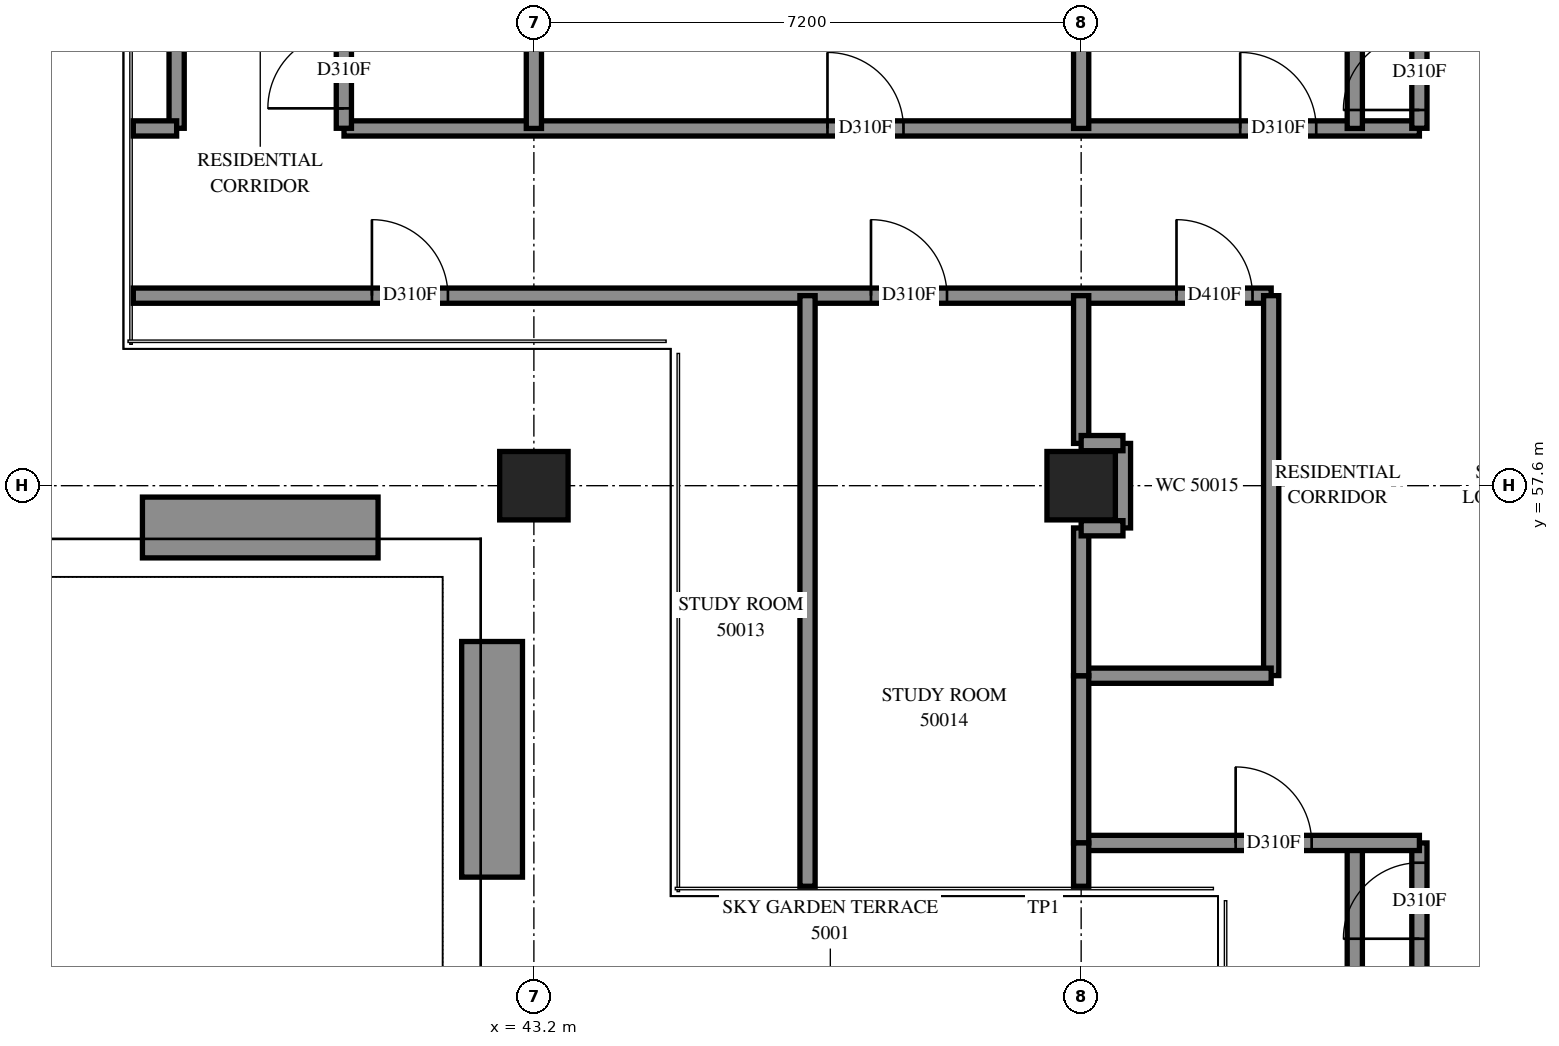
"""IFC4 building model, lengths in metres.
Left out: names, types, materials, properties, quantities, classifications, styles, units other than length and angle.
Written with IfcOpenShell. Run it as: python <this file> out.ifc"""

import sys

from ifc_helpers import new_model, si_unit, direction, frame, frame_2d, origin, origin_2d, place, context, subcontext, project, spatial, rectangle, extrude, element, fill, save


model = new_model("IFC4")
c1 = context("Model", 3, precision=1e-05, world=origin(), true_north=direction((0.0, 1.0)))
c2 = subcontext(c1, "Body", "Model", "MODEL_VIEW")
j1 = project(units=[si_unit("LENGTHUNIT", "METRE"), si_unit("PLANEANGLEUNIT", "RADIAN")], contexts=[c1])
p1 = place(None, origin())
s1 = spatial("IfcSite", under=j1, at=p1, CompositionType="ELEMENT")
p2 = place(p1, origin())
s2 = spatial("IfcBuilding", under=s1, at=p2, CompositionType="ELEMENT")
p3 = place(p2, frame((0.0, 0.0, 185.4)))
s3 = spatial("IfcBuildingStorey", under=s2, at=p3, CompositionType="ELEMENT", Elevation=185.4)
for number, where, z_axis, x_axis in (
    (1, (43.2, 57.6, 0.0), (0.0, 0.0, 1.0), (1.0, 0.0, 0.0)),
    (2, (50.4, 57.6, 0.0), (0.0, 0.0, 1.0), (1.0, 0.0, 0.0)),
):
    element("IfcColumn", number, at=place(p3, frame(where, z_axis=z_axis, x_axis=x_axis)), inside=s3, PredefinedType="COLUMN", context=c2, shape_type="SweptSolid", body=[
        extrude(rectangle(XDim=0.9, YDim=0.9, at=origin_2d()), origin(), (0.0, 0.0, 1.0), 3.9),
    ])
for number, where, z_axis, x_axis in (
    (3, (38.05, 57.05, 0.0), (0.0, 0.0, 1.0), (1.0, 0.0, 0.0)),
    (4, (42.65, 55.55, 0.0), (0.0, 0.0, 1.0), (0.0, -1.0, 0.0)),
):
    element("IfcWall", number, at=place(p3, frame(where, z_axis=z_axis, x_axis=x_axis)), inside=s3, PredefinedType="SOLIDWALL", context=c2, shape_type="SweptSolid", body=[
        extrude(rectangle(XDim=3.1, YDim=0.8, at=frame_2d((1.55, 0.0))), origin(), (0.0, 0.0, 1.0), 0.65),
    ])
p4 = place(p3, frame((37.93, 60.1, 0.0), z_axis=(0.0, 0.0, 1.0), x_axis=(1.0, 0.0, 0.0)))
e5 = element("IfcWall", 5, at=p4, inside=s3, PredefinedType="PARTITIONING", context=c2, shape_type="SweptSolid", body=[
    extrude(rectangle(XDim=14.97, YDim=0.2, at=frame_2d((7.485, 0.0))), origin(), (0.0, 0.0, 1.0), 3.9),
])
p5 = place(p4, frame((3.139, 0.0, 0.0)))
e6 = element("IfcOpeningElement", 6, at=p5, cuts=e5, PredefinedType="OPENING", context=c2, shape_type="SweptSolid", body=[
    extrude(rectangle(XDim=1.0, YDim=2.1, at=frame_2d((0.5, 1.05))), frame((0.0, 0.11, 0.0), z_axis=(0.0, -1.0, 0.0), x_axis=(1.0, 0.0, 0.0)), (0.0, 0.0, 1.0), 0.22),
])
p6 = place(p4, frame((9.705, 0.0, 0.0)))
e7 = element("IfcOpeningElement", 7, at=p6, cuts=e5, PredefinedType="OPENING", context=c2, shape_type="SweptSolid", body=[
    extrude(rectangle(XDim=1.0, YDim=2.1, at=frame_2d((0.5, 1.05))), frame((0.0, 0.11, 0.0), z_axis=(0.0, -1.0, 0.0), x_axis=(1.0, 0.0, 0.0)), (0.0, 0.0, 1.0), 0.22),
])
p7 = place(p4, frame((13.724, 0.0, 0.0)))
e8 = element("IfcOpeningElement", 8, at=p7, cuts=e5, PredefinedType="OPENING", context=c2, shape_type="SweptSolid", body=[
    extrude(rectangle(XDim=1.0, YDim=2.1, at=frame_2d((0.5, 1.05))), frame((0.0, 0.11, 0.0), z_axis=(0.0, -1.0, 0.0), x_axis=(1.0, 0.0, 0.0)), (0.0, 0.0, 1.0), 0.22),
])
p8 = place(p3, frame((40.702, 62.3, 0.0), z_axis=(0.0, 0.0, 1.0), x_axis=(1.0, 0.0, 0.0)))
e9 = element("IfcWall", 9, at=p8, inside=s3, PredefinedType="PARTITIONING", context=c2, shape_type="SweptSolid", body=[
    extrude(rectangle(XDim=14.148, YDim=0.2, at=frame_2d((7.074, 0.0))), origin(), (0.0, 0.0, 1.0), 3.9),
])
p9 = place(p8, frame((6.361, 0.0, 0.0)))
e10 = element("IfcOpeningElement", 10, at=p9, cuts=e9, PredefinedType="OPENING", context=c2, shape_type="SweptSolid", body=[
    extrude(rectangle(XDim=1.0, YDim=2.1, at=frame_2d((0.5, 1.05))), frame((0.0, 0.11, 0.0), z_axis=(0.0, -1.0, 0.0), x_axis=(1.0, 0.0, 0.0)), (0.0, 0.0, 1.0), 0.22),
])
p10 = place(p8, frame((11.79, 0.0, 0.0)))
e11 = element("IfcOpeningElement", 11, at=p10, cuts=e9, PredefinedType="OPENING", context=c2, shape_type="SweptSolid", body=[
    extrude(rectangle(XDim=1.0, YDim=2.1, at=frame_2d((0.5, 1.05))), frame((0.0, 0.11, 0.0), z_axis=(0.0, -1.0, 0.0), x_axis=(1.0, 0.0, 0.0)), (0.0, 0.0, 1.0), 0.22),
])
for number, where, z_axis, x_axis in (
    (12, (46.8, 52.33, 0.0), (0.0, 0.0, 1.0), (0.0, 1.0, 0.0)),
    (13, (54.0, 45.13, 0.0), (0.0, 0.0, 1.0), (0.0, 1.0, 0.0)),
    (14, (54.0, 62.3, 0.0), (0.0, 0.0, 1.0), (0.0, 1.0, 0.0)),
):
    element("IfcWall", number, at=place(p3, frame(where, z_axis=z_axis, x_axis=x_axis)), inside=s3, PredefinedType="PARTITIONING", context=c2, shape_type="SweptSolid", body=[
        extrude(rectangle(XDim=7.77, YDim=0.2, at=frame_2d((3.885, 0.0))), origin(), (0.0, 0.0, 1.0), 3.9),
    ])
p11 = place(p3, frame((54.85, 47.65, 0.0), z_axis=(0.0, 0.0, 1.0), x_axis=(0.0, 1.0, 0.0)))
e15 = element("IfcWall", 15, at=p11, inside=s3, PredefinedType="PARTITIONING", context=c2, shape_type="SweptSolid", body=[
    extrude(rectangle(XDim=5.25, YDim=0.2, at=frame_2d((2.625, 0.0))), origin(), (0.0, 0.0, 1.0), 3.9),
])
p12 = place(p11, frame((3.99, 0.0, 0.0)))
e16 = element("IfcOpeningElement", 16, at=p12, cuts=e15, PredefinedType="OPENING", context=c2, shape_type="SweptSolid", body=[
    extrude(rectangle(XDim=1.0, YDim=2.1, at=frame_2d((0.5, 1.05))), frame((0.0, 0.11, 0.0), z_axis=(0.0, -1.0, 0.0), x_axis=(1.0, 0.0, 0.0)), (0.0, 0.0, 1.0), 0.22),
])
p13 = place(p3, frame((54.85, 62.302, 0.0), z_axis=(0.0, 0.0, 1.0), x_axis=(0.0, 1.0, 0.0)))
e17 = element("IfcWall", 17, at=p13, inside=s3, PredefinedType="PARTITIONING", context=c2, shape_type="SweptSolid", body=[
    extrude(rectangle(XDim=5.248, YDim=0.2, at=frame_2d((2.624, 0.0))), origin(), (0.0, 0.0, 1.0), 3.9),
])
p14 = place(p13, frame((0.241, 0.0, 0.0)))
e18 = element("IfcOpeningElement", 18, at=p14, cuts=e17, PredefinedType="OPENING", context=c2, shape_type="SweptSolid", body=[
    extrude(rectangle(XDim=1.0, YDim=2.1, at=frame_2d((0.5, 1.05))), frame((0.0, 0.11, 0.0), z_axis=(0.0, -1.0, 0.0), x_axis=(1.0, 0.0, 0.0)), (0.0, 0.0, 1.0), 0.22),
])
p15 = place(p3, frame((52.9, 55.102, 0.0), z_axis=(0.0, 0.0, 1.0), x_axis=(0.0, 1.0, 0.0)))
e19 = element("IfcWall", 19, at=p15, inside=s3, PredefinedType="PARTITIONING", context=c2, shape_type="SweptSolid", body=[
    extrude(rectangle(XDim=4.998, YDim=0.2, at=frame_2d((2.499, 0.0))), origin(), (0.0, 0.0, 1.0), 3.9),
])
p16 = place(p3, frame((40.7, 62.302, 0.0), z_axis=(0.0, 0.0, 1.0), x_axis=(0.0, 1.0, 0.0)))
e20 = element("IfcWall", 20, at=p16, inside=s3, PredefinedType="PARTITIONING", context=c2, shape_type="SweptSolid", body=[
    extrude(rectangle(XDim=4.798, YDim=0.2, at=frame_2d((2.399, 0.0))), origin(), (0.0, 0.0, 1.0), 3.9),
])
p17 = place(p16, frame((0.262, 0.0, 0.0)))
e21 = element("IfcOpeningElement", 21, at=p17, cuts=e20, PredefinedType="OPENING", context=c2, shape_type="SweptSolid", body=[
    extrude(rectangle(XDim=1.0, YDim=2.1, at=frame_2d((0.5, 1.05))), frame((0.0, 0.11, 0.0), z_axis=(0.0, -1.0, 0.0), x_axis=(1.0, 0.0, 0.0)), (0.0, 0.0, 1.0), 0.22),
])
p18 = place(p3, frame((50.4, 52.9, 0.0), z_axis=(0.0, 0.0, 1.0), x_axis=(1.0, 0.0, 0.0)))
e22 = element("IfcWall", 22, at=p18, inside=s3, PredefinedType="PARTITIONING", context=c2, shape_type="SweptSolid", body=[
    extrude(rectangle(XDim=4.45, YDim=0.2, at=frame_2d((2.225, 0.0))), origin(), (0.0, 0.0, 1.0), 3.9),
])
p19 = place(p18, frame((2.033, 0.0, 0.0)))
e23 = element("IfcOpeningElement", 23, at=p19, cuts=e22, PredefinedType="OPENING", context=c2, shape_type="SweptSolid", body=[
    extrude(rectangle(XDim=1.0, YDim=2.1, at=frame_2d((0.5, 1.05))), frame((0.0, 0.11, 0.0), z_axis=(0.0, -1.0, 0.0), x_axis=(1.0, 0.0, 0.0)), (0.0, 0.0, 1.0), 0.22),
])
p20 = place(p3, frame((38.5, 62.302, 0.0), z_axis=(0.0, 0.0, 1.0), x_axis=(0.0, 1.0, 0.0)))
e24 = element("IfcWall", 24, at=p20, inside=s3, PredefinedType="PARTITIONING", context=c2, shape_type="SweptSolid", body=[
    extrude(rectangle(XDim=2.598, YDim=0.2, at=frame_2d((1.299, 0.0))), origin(), (0.0, 0.0, 1.0), 3.9),
])
p21 = place(p3, frame((50.4, 55.1, 0.0), z_axis=(0.0, 0.0, 1.0), x_axis=(1.0, 0.0, 0.0)))
e25 = element("IfcWall", 25, at=p21, inside=s3, PredefinedType="PARTITIONING", context=c2, shape_type="SweptSolid", body=[
    extrude(rectangle(XDim=2.5, YDim=0.2, at=frame_2d((1.25, 0.0))), origin(), (0.0, 0.0, 1.0), 3.9),
])
p22 = place(p3, frame((50.4, 52.9, 0.0), z_axis=(0.0, 0.0, 1.0), x_axis=(0.0, 1.0, 0.0)))
e26 = element("IfcWall", 26, at=p22, inside=s3, PredefinedType="PARTITIONING", context=c2, shape_type="SweptSolid", body=[
    extrude(rectangle(XDim=2.2, YDim=0.2, at=frame_2d((1.1, 0.0))), origin(), (0.0, 0.0, 1.0), 3.9),
])
for number, where, z_axis, x_axis in (
    (27, (43.2, 62.3, 0.0), (0.0, 0.0, 1.0), (0.0, 1.0, 0.0)),
    (28, (50.4, 62.3, 0.0), (0.0, 0.0, 1.0), (0.0, 1.0, 0.0)),
):
    element("IfcWall", number, at=place(p3, frame(where, z_axis=z_axis, x_axis=x_axis)), inside=s3, PredefinedType="PARTITIONING", context=c2, shape_type="SweptSolid", body=[
        extrude(rectangle(XDim=2.05, YDim=0.2, at=frame_2d((1.025, 0.0))), origin(), (0.0, 0.0, 1.0), 3.9),
    ])
for number, where, z_axis, x_axis in (
    (29, (50.4, 58.156, 0.0), (0.0, 0.0, 1.0), (0.0, 1.0, 0.0)),
    (30, (50.4, 55.1, 0.0), (0.0, 0.0, 1.0), (0.0, 1.0, 0.0)),
):
    element("IfcWall", number, at=place(p3, frame(where, z_axis=z_axis, x_axis=x_axis)), inside=s3, PredefinedType="PARTITIONING", context=c2, shape_type="SweptSolid", body=[
        extrude(rectangle(XDim=1.944, YDim=0.2, at=frame_2d((0.972, 0.0))), origin(), (0.0, 0.0, 1.0), 3.9),
    ])
p23 = place(p3, frame((50.95, 57.044, 0.0), z_axis=(0.0, 0.0, 1.0), x_axis=(0.0, 1.0, 0.0)))
e31 = element("IfcWall", 31, at=p23, inside=s3, PredefinedType="PARTITIONING", context=c2, shape_type="SweptSolid", body=[
    extrude(rectangle(XDim=1.112, YDim=0.2, at=frame_2d((0.556, 0.0))), origin(), (0.0, 0.0, 1.0), 3.9),
])
for number, where, z_axis, x_axis in (
    (32, (37.93, 62.3, 0.0), (0.0, 0.0, 1.0), (1.0, 0.0, 0.0)),
    (33, (50.4, 52.33, 0.0), (0.0, 0.0, 1.0), (0.0, 1.0, 0.0)),
):
    element("IfcWall", number, at=place(p3, frame(where, z_axis=z_axis, x_axis=x_axis)), inside=s3, PredefinedType="PARTITIONING", context=c2, shape_type="SweptSolid", body=[
        extrude(rectangle(XDim=0.57, YDim=0.2, at=frame_2d((0.285, 0.0))), origin(), (0.0, 0.0, 1.0), 3.9),
    ])
for number, where, z_axis, x_axis in (
    (34, (50.4, 58.16, 0.0), (0.0, 0.0, 1.0), (1.0, 0.0, 0.0)),
    (35, (50.4, 57.04, 0.0), (0.0, 0.0, 1.0), (1.0, 0.0, 0.0)),
):
    element("IfcWall", number, at=place(p3, frame(where, z_axis=z_axis, x_axis=x_axis)), inside=s3, PredefinedType="PARTITIONING", context=c2, shape_type="SweptSolid", body=[
        extrude(rectangle(XDim=0.55, YDim=0.2, at=frame_2d((0.275, 0.0))), origin(), (0.0, 0.0, 1.0), 3.9),
    ])
p24 = place(p5, origin())
e36 = element("IfcDoor", 36, at=p24, inside=s3, OperationType="SINGLE_SWING_RIGHT", PredefinedType="DOOR", context=c2, shape_type="SweptSolid", body=[
    extrude(rectangle(XDim=1.0, YDim=2.1, at=frame_2d((0.5, 1.05))), frame((0.0, 0.025, 0.0), z_axis=(0.0, -1.0, 0.0), x_axis=(1.0, 0.0, 0.0)), (0.0, 0.0, 1.0), 0.05),
])
fill(e6, e36)
p25 = place(p6, origin())
e37 = element("IfcDoor", 37, at=p25, inside=s3, OperationType="SINGLE_SWING_RIGHT", PredefinedType="DOOR", context=c2, shape_type="SweptSolid", body=[
    extrude(rectangle(XDim=1.0, YDim=2.1, at=frame_2d((0.5, 1.05))), frame((0.0, 0.025, 0.0), z_axis=(0.0, -1.0, 0.0), x_axis=(1.0, 0.0, 0.0)), (0.0, 0.0, 1.0), 0.05),
])
fill(e7, e37)
p26 = place(p7, origin())
e38 = element("IfcDoor", 38, at=p26, inside=s3, OperationType="SINGLE_SWING_LEFT", PredefinedType="DOOR", context=c2, shape_type="SweptSolid", body=[
    extrude(rectangle(XDim=1.0, YDim=2.1, at=frame_2d((0.5, 1.05))), frame((0.0, 0.025, 0.0), z_axis=(0.0, -1.0, 0.0), x_axis=(1.0, 0.0, 0.0)), (0.0, 0.0, 1.0), 0.05),
])
fill(e8, e38)
p27 = place(p19, origin())
e39 = element("IfcDoor", 39, at=p27, inside=s3, OperationType="SINGLE_SWING_LEFT", PredefinedType="DOOR", context=c2, shape_type="SweptSolid", body=[
    extrude(rectangle(XDim=1.0, YDim=2.1, at=frame_2d((0.5, 1.05))), frame((0.0, 0.025, 0.0), z_axis=(0.0, -1.0, 0.0), x_axis=(1.0, 0.0, 0.0)), (0.0, 0.0, 1.0), 0.05),
])
fill(e23, e39)
p28 = place(p12, origin())
e40 = element("IfcDoor", 40, at=p28, inside=s3, OperationType="SINGLE_SWING_RIGHT", PredefinedType="DOOR", context=c2, shape_type="SweptSolid", body=[
    extrude(rectangle(XDim=1.0, YDim=2.1, at=frame_2d((0.5, 1.05))), frame((0.0, 0.025, 0.0), z_axis=(0.0, -1.0, 0.0), x_axis=(1.0, 0.0, 0.0)), (0.0, 0.0, 1.0), 0.05),
])
fill(e16, e40)
p29 = place(p17, origin())
e41 = element("IfcDoor", 41, at=p29, inside=s3, OperationType="SINGLE_SWING_LEFT", PredefinedType="DOOR", context=c2, shape_type="SweptSolid", body=[
    extrude(rectangle(XDim=1.0, YDim=2.1, at=frame_2d((0.5, 1.05))), frame((0.0, 0.025, 0.0), z_axis=(0.0, -1.0, 0.0), x_axis=(1.0, 0.0, 0.0)), (0.0, 0.0, 1.0), 0.05),
])
fill(e21, e41)
p30 = place(p9, origin())
e42 = element("IfcDoor", 42, at=p30, inside=s3, OperationType="SINGLE_SWING_RIGHT", PredefinedType="DOOR", context=c2, shape_type="SweptSolid", body=[
    extrude(rectangle(XDim=1.0, YDim=2.1, at=frame_2d((0.5, 1.05))), frame((0.0, 0.025, 0.0), z_axis=(0.0, -1.0, 0.0), x_axis=(1.0, 0.0, 0.0)), (0.0, 0.0, 1.0), 0.05),
])
fill(e10, e42)
p31 = place(p10, origin())
e43 = element("IfcDoor", 43, at=p31, inside=s3, OperationType="SINGLE_SWING_RIGHT", PredefinedType="DOOR", context=c2, shape_type="SweptSolid", body=[
    extrude(rectangle(XDim=1.0, YDim=2.1, at=frame_2d((0.5, 1.05))), frame((0.0, 0.025, 0.0), z_axis=(0.0, -1.0, 0.0), x_axis=(1.0, 0.0, 0.0)), (0.0, 0.0, 1.0), 0.05),
])
fill(e11, e43)
p32 = place(p14, origin())
e44 = element("IfcDoor", 44, at=p32, inside=s3, OperationType="SINGLE_SWING_LEFT", PredefinedType="DOOR", context=c2, shape_type="SweptSolid", body=[
    extrude(rectangle(XDim=1.0, YDim=2.1, at=frame_2d((0.5, 1.05))), frame((0.0, 0.025, 0.0), z_axis=(0.0, -1.0, 0.0), x_axis=(1.0, 0.0, 0.0)), (0.0, 0.0, 1.0), 0.05),
])
fill(e18, e44)
save(model, sys.argv[1])
